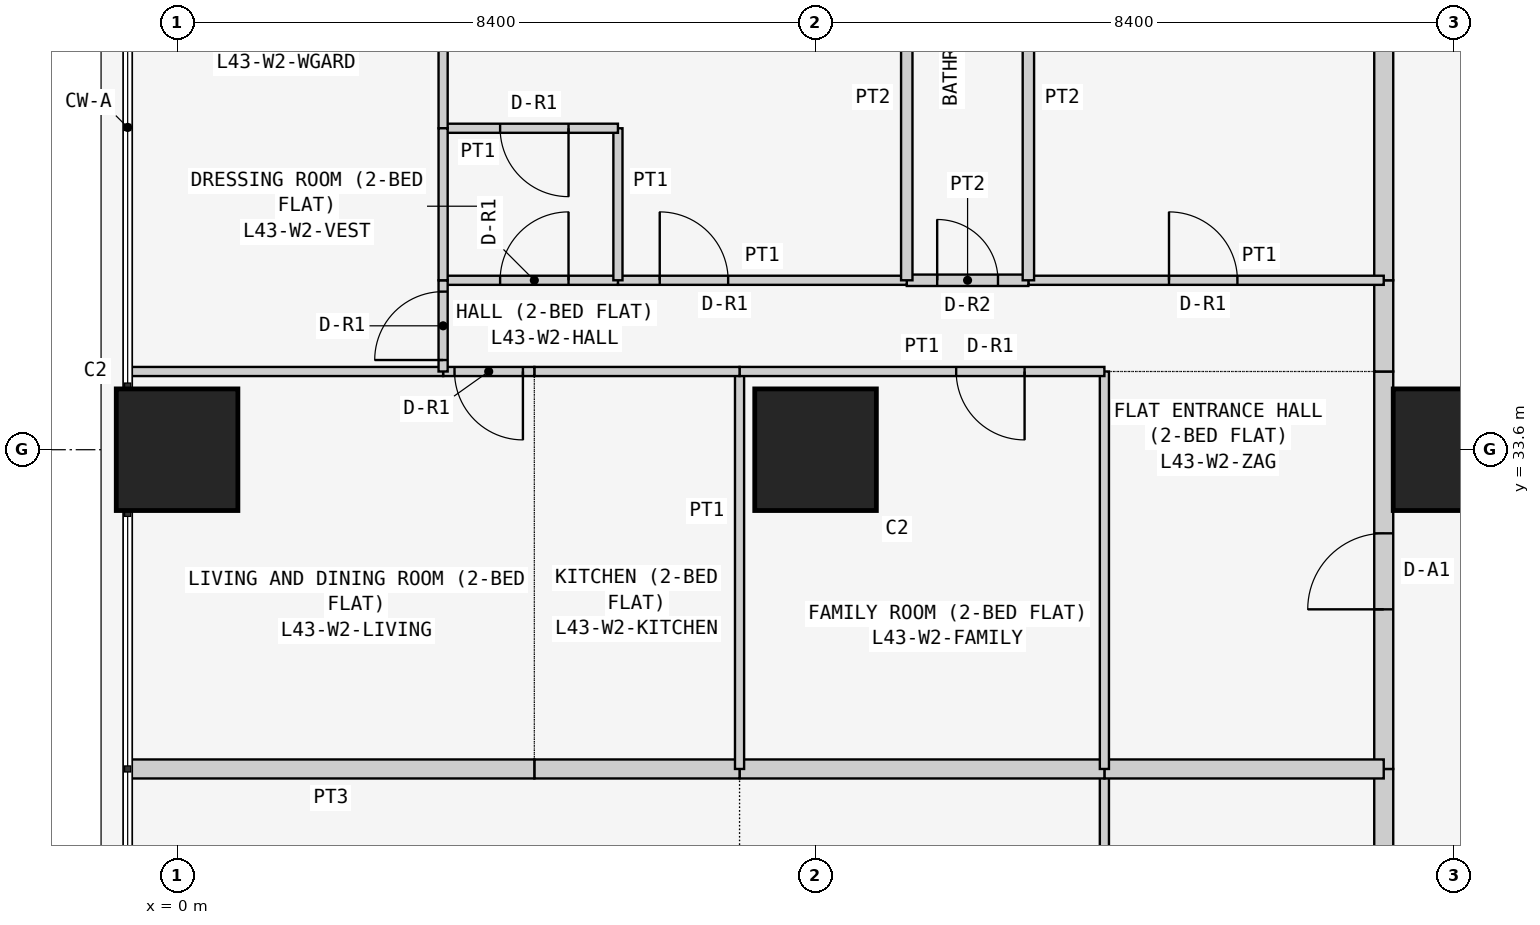
"""IFC4 building model, lengths in metres.
Left out: names, types, materials, properties, quantities, classifications, styles, units other than length and angle.
Written with IfcOpenShell. Run it as: python <this file> out.ifc"""

import sys

from ifc_helpers import new_model, si_unit, direction, frame, frame_2d, origin, origin_2d, place, context, subcontext, project, spatial, rectangle, extrude, element, fill, save


model = new_model("IFC4")
c1 = context("Model", 3, precision=1e-05, world=origin(), true_north=direction((0.0, 1.0)))
c2 = subcontext(c1, "Body", "Model", "MODEL_VIEW")
j1 = project(units=[si_unit("LENGTHUNIT", "METRE"), si_unit("PLANEANGLEUNIT", "RADIAN")], contexts=[c1])
p1 = place(None, origin())
s1 = spatial("IfcSite", under=j1, at=p1, CompositionType="ELEMENT")
p2 = place(p1, origin())
s2 = spatial("IfcBuilding", under=s1, at=p2, CompositionType="ELEMENT")
p3 = place(p2, frame((0.0, 0.0, 166.5)))
s3 = spatial("IfcBuildingStorey", under=s2, at=p3, CompositionType="ELEMENT", Elevation=166.5)
for number, where, z_axis, x_axis in (
    (1, (0.0, 33.6, 0.0), (0.0, 0.0, 1.0), (1.0, 0.0, 0.0)),
    (2, (8.4, 33.6, 0.0), (0.0, 0.0, 1.0), (1.0, 0.0, 0.0)),
    (3, (16.8, 33.6, 0.0), (0.0, 0.0, 1.0), (1.0, 0.0, 0.0)),
):
    element("IfcColumn", number, at=place(p3, frame(where, z_axis=z_axis, x_axis=x_axis)), inside=s3, PredefinedType="COLUMN", context=c2, shape_type="SweptSolid", body=[
        extrude(rectangle(XDim=1.6, YDim=1.6, at=origin_2d()), origin(), (0.0, 0.0, 1.0), 3.6),
    ])
p4 = place(p3, frame((15.875, 24.171, 0.0), z_axis=(0.0, 0.0, 1.0), x_axis=(0.0, 1.0, 0.0)))
e4 = element("IfcWall", 4, at=p4, inside=s3, PredefinedType="PARTITIONING", context=c2, shape_type="SweptSolid", body=[
    extrude(rectangle(XDim=5.229, YDim=0.25, at=frame_2d((2.615, 0.0))), origin(), (0.0, 0.0, 1.0), 3.45),
])
p5 = place(p4, frame((2.129, 0.0, 0.0)))
e5 = element("IfcOpeningElement", 5, at=p5, cuts=e4, PredefinedType="OPENING", context=c2, shape_type="SweptSolid", body=[
    extrude(rectangle(XDim=1.0, YDim=2.1, at=frame_2d((0.5, 1.05))), frame((0.0, 0.135, 0.0), z_axis=(0.0, -1.0, 0.0), x_axis=(1.0, 0.0, 0.0)), (0.0, 0.0, 1.0), 0.27),
])
p6 = place(p3, frame((15.875, 29.4, 0.0), z_axis=(0.0, 0.0, 1.0), x_axis=(0.0, 1.0, 0.0)))
e6 = element("IfcWall", 6, at=p6, inside=s3, PredefinedType="PARTITIONING", context=c2, shape_type="SweptSolid", body=[
    extrude(rectangle(XDim=5.229, YDim=0.25, at=frame_2d((2.615, 0.0))), origin(), (0.0, 0.0, 1.0), 3.45),
])
p7 = place(p6, frame((2.1, 0.0, 0.0)))
e7 = element("IfcOpeningElement", 7, at=p7, cuts=e6, PredefinedType="OPENING", context=c2, shape_type="SweptSolid", body=[
    extrude(rectangle(XDim=1.0, YDim=2.1, at=frame_2d((0.5, 1.05))), frame((0.0, 0.135, 0.0), z_axis=(0.0, -1.0, 0.0), x_axis=(1.0, 0.0, 0.0)), (0.0, 0.0, 1.0), 0.27),
])
p8 = place(p3, frame((15.875, 34.629, 0.0), z_axis=(0.0, 0.0, 1.0), x_axis=(0.0, 1.0, 0.0)))
e8 = element("IfcWall", 8, at=p8, inside=s3, PredefinedType="PARTITIONING", context=c2, shape_type="SweptSolid", body=[
    extrude(rectangle(XDim=1.2, YDim=0.25, at=frame_2d((0.6, 0.0))), origin(), (0.0, 0.0, 1.0), 3.45),
])
p9 = place(p3, frame((15.875, 35.829, 0.0), z_axis=(0.0, 0.0, 1.0), x_axis=(0.0, 1.0, 0.0)))
e9 = element("IfcWall", 9, at=p9, inside=s3, PredefinedType="PARTITIONING", context=c2, shape_type="SweptSolid", body=[
    extrude(rectangle(XDim=6.871, YDim=0.25, at=frame_2d((3.436, 0.0))), origin(), (0.0, 0.0, 1.0), 3.45),
])
p10 = place(p3, frame((12.2, 29.4, 0.0), z_axis=(0.0, 0.0, 1.0), x_axis=(0.0, -1.0, 0.0)))
e10 = element("IfcWall", 10, at=p10, inside=s3, PredefinedType="PARTITIONING", context=c2, shape_type="SweptSolid", body=[
    extrude(rectangle(XDim=5.229, YDim=0.12, at=frame_2d((2.615, 0.0))), origin(), (0.0, 0.0, 1.0), 3.45),
])
p11 = place(p10, frame((1.05, 0.0, 0.0)))
e11 = element("IfcOpeningElement", 11, at=p11, cuts=e10, PredefinedType="OPENING", context=c2, shape_type="SweptSolid", body=[
    extrude(rectangle(XDim=0.9, YDim=2.1, at=frame_2d((0.45, 1.05))), frame((0.0, 0.07, 0.0), z_axis=(0.0, -1.0, 0.0), x_axis=(1.0, 0.0, 0.0)), (0.0, 0.0, 1.0), 0.14),
])
p12 = place(p3, frame((15.875, 29.4, 0.0), z_axis=(0.0, 0.0, 1.0), x_axis=(-1.0, 0.0, 0.0)))
e12 = element("IfcWall", 12, at=p12, inside=s3, PredefinedType="PARTITIONING", context=c2, shape_type="SweptSolid", body=[
    extrude(rectangle(XDim=3.675, YDim=0.25, at=frame_2d((1.837, 0.0))), origin(), (0.0, 0.0, 1.0), 3.45),
])
p13 = place(p3, frame((12.2, 29.4, 0.0), z_axis=(0.0, 0.0, 1.0), x_axis=(-1.0, 0.0, 0.0)))
e13 = element("IfcWall", 13, at=p13, inside=s3, PredefinedType="PARTITIONING", context=c2, shape_type="SweptSolid", body=[
    extrude(rectangle(XDim=4.8, YDim=0.25, at=frame_2d((2.4, 0.0))), origin(), (0.0, 0.0, 1.0), 3.45),
])
p14 = place(p3, frame((7.4, 29.4, 0.0), z_axis=(0.0, 0.0, 1.0), x_axis=(-1.0, 0.0, 0.0)))
e14 = element("IfcWall", 14, at=p14, inside=s3, PredefinedType="PARTITIONING", context=c2, shape_type="SweptSolid", body=[
    extrude(rectangle(XDim=2.7, YDim=0.25, at=frame_2d((1.35, 0.0))), origin(), (0.0, 0.0, 1.0), 3.45),
])
p15 = place(p3, frame((4.7, 29.4, 0.0), z_axis=(0.0, 0.0, 1.0), x_axis=(-1.0, 0.0, 0.0)))
e15 = element("IfcWall", 15, at=p15, inside=s3, PredefinedType="PARTITIONING", context=c2, shape_type="SweptSolid", body=[
    extrude(rectangle(XDim=5.35, YDim=0.25, at=frame_2d((2.675, 0.0))), origin(), (0.0, 0.0, 1.0), 3.45),
])
for number, where, z_axis, x_axis in (
    (16, (12.2, 29.4, 0.0), (0.0, 0.0, 1.0), (0.0, 1.0, 0.0)),
    (17, (7.4, 29.4, 0.0), (0.0, 0.0, 1.0), (0.0, 1.0, 0.0)),
):
    element("IfcWall", number, at=place(p3, frame(where, z_axis=z_axis, x_axis=x_axis)), inside=s3, PredefinedType="PARTITIONING", context=c2, shape_type="SweptSolid", body=[
        extrude(rectangle(XDim=5.229, YDim=0.12, at=frame_2d((2.615, 0.0))), origin(), (0.0, 0.0, 1.0), 3.45),
    ])
p16 = place(p3, frame((7.4, 34.629, 0.0), z_axis=(0.0, 0.0, 1.0), x_axis=(1.0, 0.0, 0.0)))
e18 = element("IfcWall", 18, at=p16, inside=s3, PredefinedType="PARTITIONING", context=c2, shape_type="SweptSolid", body=[
    extrude(rectangle(XDim=4.8, YDim=0.12, at=frame_2d((2.4, 0.0))), origin(), (0.0, 0.0, 1.0), 3.45),
])
p17 = place(p16, frame((2.85, 0.0, 0.0)))
e19 = element("IfcOpeningElement", 19, at=p17, cuts=e18, PredefinedType="OPENING", context=c2, shape_type="SweptSolid", body=[
    extrude(rectangle(XDim=0.9, YDim=2.1, at=frame_2d((0.45, 1.05))), frame((0.0, 0.07, 0.0), z_axis=(0.0, -1.0, 0.0), x_axis=(1.0, 0.0, 0.0)), (0.0, 0.0, 1.0), 0.14),
])
p18 = place(p3, frame((4.7, 34.629, 0.0), z_axis=(0.0, 0.0, 1.0), x_axis=(1.0, 0.0, 0.0)))
e20 = element("IfcWall", 20, at=p18, inside=s3, PredefinedType="PARTITIONING", context=c2, shape_type="SweptSolid", body=[
    extrude(rectangle(XDim=2.7, YDim=0.12, at=frame_2d((1.35, 0.0))), origin(), (0.0, 0.0, 1.0), 3.45),
])
p19 = place(p3, frame((3.5, 34.629, 0.0), z_axis=(0.0, 0.0, 1.0), x_axis=(1.0, 0.0, 0.0)))
e21 = element("IfcWall", 21, at=p19, inside=s3, PredefinedType="PARTITIONING", context=c2, shape_type="SweptSolid", body=[
    extrude(rectangle(XDim=1.2, YDim=0.12, at=frame_2d((0.6, 0.0))), origin(), (0.0, 0.0, 1.0), 3.45),
])
p20 = place(p19, frame((0.15, 0.0, 0.0)))
e22 = element("IfcOpeningElement", 22, at=p20, cuts=e21, PredefinedType="OPENING", context=c2, shape_type="SweptSolid", body=[
    extrude(rectangle(XDim=0.9, YDim=2.1, at=frame_2d((0.45, 1.05))), frame((0.0, 0.07, 0.0), z_axis=(0.0, -1.0, 0.0), x_axis=(1.0, 0.0, 0.0)), (0.0, 0.0, 1.0), 0.14),
])
p21 = place(p3, frame((-0.65, 34.629, 0.0), z_axis=(0.0, 0.0, 1.0), x_axis=(1.0, 0.0, 0.0)))
e23 = element("IfcWall", 23, at=p21, inside=s3, PredefinedType="PARTITIONING", context=c2, shape_type="SweptSolid", body=[
    extrude(rectangle(XDim=4.15, YDim=0.12, at=frame_2d((2.075, 0.0))), origin(), (0.0, 0.0, 1.0), 3.45),
])
p22 = place(p3, frame((11.2, 35.829, 0.0), z_axis=(0.0, 0.0, 1.0), x_axis=(1.0, 0.0, 0.0)))
e24 = element("IfcWall", 24, at=p22, inside=s3, PredefinedType="PARTITIONING", context=c2, shape_type="SweptSolid", body=[
    extrude(rectangle(XDim=4.675, YDim=0.12, at=frame_2d((2.337, 0.0))), origin(), (0.0, 0.0, 1.0), 3.45),
])
p23 = place(p22, frame((1.85, 0.0, 0.0)))
e25 = element("IfcOpeningElement", 25, at=p23, cuts=e24, PredefinedType="OPENING", context=c2, shape_type="SweptSolid", body=[
    extrude(rectangle(XDim=0.9, YDim=2.1, at=frame_2d((0.45, 1.05))), frame((0.0, 0.07, 0.0), z_axis=(0.0, -1.0, 0.0), x_axis=(1.0, 0.0, 0.0)), (0.0, 0.0, 1.0), 0.14),
])
p24 = place(p3, frame((9.6, 35.829, 0.0), z_axis=(0.0, 0.0, 1.0), x_axis=(1.0, 0.0, 0.0)))
e26 = element("IfcWall", 26, at=p24, inside=s3, PredefinedType="PARTITIONING", context=c2, shape_type="SweptSolid", body=[
    extrude(rectangle(XDim=1.6, YDim=0.15, at=frame_2d((0.8, 0.0))), origin(), (0.0, 0.0, 1.0), 3.45),
])
p25 = place(p24, frame((0.4, 0.0, 0.0)))
e27 = element("IfcOpeningElement", 27, at=p25, cuts=e26, PredefinedType="OPENING", context=c2, shape_type="SweptSolid", body=[
    extrude(rectangle(XDim=0.8, YDim=2.1, at=frame_2d((0.4, 1.05))), frame((0.0, 0.085, 0.0), z_axis=(0.0, -1.0, 0.0), x_axis=(1.0, 0.0, 0.0)), (0.0, 0.0, 1.0), 0.17),
])
p26 = place(p3, frame((5.8, 35.829, 0.0), z_axis=(0.0, 0.0, 1.0), x_axis=(1.0, 0.0, 0.0)))
e28 = element("IfcWall", 28, at=p26, inside=s3, PredefinedType="PARTITIONING", context=c2, shape_type="SweptSolid", body=[
    extrude(rectangle(XDim=3.8, YDim=0.12, at=frame_2d((1.9, 0.0))), origin(), (0.0, 0.0, 1.0), 3.45),
])
p27 = place(p26, frame((0.55, 0.0, 0.0)))
e29 = element("IfcOpeningElement", 29, at=p27, cuts=e28, PredefinedType="OPENING", context=c2, shape_type="SweptSolid", body=[
    extrude(rectangle(XDim=0.9, YDim=2.1, at=frame_2d((0.45, 1.05))), frame((0.0, 0.07, 0.0), z_axis=(0.0, -1.0, 0.0), x_axis=(1.0, 0.0, 0.0)), (0.0, 0.0, 1.0), 0.14),
])
p28 = place(p3, frame((3.5, 35.829, 0.0), z_axis=(0.0, 0.0, 1.0), x_axis=(1.0, 0.0, 0.0)))
e30 = element("IfcWall", 30, at=p28, inside=s3, PredefinedType="PARTITIONING", context=c2, shape_type="SweptSolid", body=[
    extrude(rectangle(XDim=2.3, YDim=0.12, at=frame_2d((1.15, 0.0))), origin(), (0.0, 0.0, 1.0), 3.45),
])
p29 = place(p28, frame((0.75, 0.0, 0.0)))
e31 = element("IfcOpeningElement", 31, at=p29, cuts=e30, PredefinedType="OPENING", context=c2, shape_type="SweptSolid", body=[
    extrude(rectangle(XDim=0.9, YDim=2.1, at=frame_2d((0.45, 1.05))), frame((0.0, 0.07, 0.0), z_axis=(0.0, -1.0, 0.0), x_axis=(1.0, 0.0, 0.0)), (0.0, 0.0, 1.0), 0.14),
])
p30 = place(p3, frame((3.5, 34.629, 0.0), z_axis=(0.0, 0.0, 1.0), x_axis=(0.0, 1.0, 0.0)))
e32 = element("IfcWall", 32, at=p30, inside=s3, PredefinedType="PARTITIONING", context=c2, shape_type="SweptSolid", body=[
    extrude(rectangle(XDim=1.2, YDim=0.12, at=frame_2d((0.6, 0.0))), origin(), (0.0, 0.0, 1.0), 3.45),
])
p31 = place(p30, frame((0.151, 0.0, 0.0)))
e33 = element("IfcOpeningElement", 33, at=p31, cuts=e32, PredefinedType="OPENING", context=c2, shape_type="SweptSolid", body=[
    extrude(rectangle(XDim=0.9, YDim=2.1, at=frame_2d((0.45, 1.05))), frame((0.0, 0.07, 0.0), z_axis=(0.0, -1.0, 0.0), x_axis=(1.0, 0.0, 0.0)), (0.0, 0.0, 1.0), 0.14),
])
for number, where, z_axis, x_axis in (
    (34, (11.2, 35.829, 0.0), (0.0, 0.0, 1.0), (0.0, 1.0, 0.0)),
    (35, (9.6, 35.829, 0.0), (0.0, 0.0, 1.0), (0.0, 1.0, 0.0)),
):
    element("IfcWall", number, at=place(p3, frame(where, z_axis=z_axis, x_axis=x_axis)), inside=s3, PredefinedType="PARTITIONING", context=c2, shape_type="SweptSolid", body=[
        extrude(rectangle(XDim=6.871, YDim=0.15, at=frame_2d((3.436, 0.0))), origin(), (0.0, 0.0, 1.0), 3.45),
    ])
p32 = place(p3, frame((5.8, 35.829, 0.0), z_axis=(0.0, 0.0, 1.0), x_axis=(0.0, 1.0, 0.0)))
e36 = element("IfcWall", 36, at=p32, inside=s3, PredefinedType="PARTITIONING", context=c2, shape_type="SweptSolid", body=[
    extrude(rectangle(XDim=2.0, YDim=0.12, at=frame_2d((1.0, 0.0))), origin(), (0.0, 0.0, 1.0), 3.45),
])
p33 = place(p3, frame((5.8, 37.829, 0.0), z_axis=(0.0, 0.0, 1.0), x_axis=(-1.0, 0.0, 0.0)))
e37 = element("IfcWall", 37, at=p33, inside=s3, PredefinedType="PARTITIONING", context=c2, shape_type="SweptSolid", body=[
    extrude(rectangle(XDim=2.3, YDim=0.12, at=frame_2d((1.15, 0.0))), origin(), (0.0, 0.0, 1.0), 3.45),
])
p34 = place(p33, frame((0.65, 0.0, 0.0)))
e38 = element("IfcOpeningElement", 38, at=p34, cuts=e37, PredefinedType="OPENING", context=c2, shape_type="SweptSolid", body=[
    extrude(rectangle(XDim=0.9, YDim=2.1, at=frame_2d((0.45, 1.05))), frame((0.0, 0.07, 0.0), z_axis=(0.0, -1.0, 0.0), x_axis=(1.0, 0.0, 0.0)), (0.0, 0.0, 1.0), 0.14),
])
p35 = place(p3, frame((3.5, 37.829, 0.0), z_axis=(0.0, 0.0, 1.0), x_axis=(0.0, 1.0, 0.0)))
e39 = element("IfcWall", 39, at=p35, inside=s3, PredefinedType="PARTITIONING", context=c2, shape_type="SweptSolid", body=[
    extrude(rectangle(XDim=4.871, YDim=0.12, at=frame_2d((2.436, 0.0))), origin(), (0.0, 0.0, 1.0), 3.45),
])
p36 = place(p3, frame((3.5, 35.829, 0.0), z_axis=(0.0, 0.0, 1.0), x_axis=(0.0, 1.0, 0.0)))
e40 = element("IfcWall", 40, at=p36, inside=s3, PredefinedType="PARTITIONING", context=c2, shape_type="SweptSolid", body=[
    extrude(rectangle(XDim=2.0, YDim=0.12, at=frame_2d((1.0, 0.0))), origin(), (0.0, 0.0, 1.0), 3.45),
])
p37 = place(p7, origin())
e41 = element("IfcDoor", 41, at=p37, inside=s3, OperationType="SINGLE_SWING_LEFT", PredefinedType="DOOR", context=c2, shape_type="SweptSolid", body=[
    extrude(rectangle(XDim=1.0, YDim=2.1, at=frame_2d((0.5, 1.05))), frame((0.0, 0.025, 0.0), z_axis=(0.0, -1.0, 0.0), x_axis=(1.0, 0.0, 0.0)), (0.0, 0.0, 1.0), 0.05),
])
fill(e7, e41)
p38 = place(p17, frame((0.9, 0.0, 0.0), z_axis=(0.0, 0.0, 1.0), x_axis=(-1.0, 0.0, 0.0)))
e42 = element("IfcDoor", 42, at=p38, inside=s3, OperationType="SINGLE_SWING_LEFT", PredefinedType="DOOR", context=c2, shape_type="SweptSolid", body=[
    extrude(rectangle(XDim=0.9, YDim=2.1, at=frame_2d((0.45, 1.05))), frame((0.0, 0.025, 0.0), z_axis=(0.0, -1.0, 0.0), x_axis=(1.0, 0.0, 0.0)), (0.0, 0.0, 1.0), 0.05),
])
fill(e19, e42)
p39 = place(p20, frame((0.9, 0.0, 0.0), z_axis=(0.0, 0.0, 1.0), x_axis=(-1.0, 0.0, 0.0)))
e43 = element("IfcDoor", 43, at=p39, inside=s3, OperationType="SINGLE_SWING_LEFT", PredefinedType="DOOR", context=c2, shape_type="SweptSolid", body=[
    extrude(rectangle(XDim=0.9, YDim=2.1, at=frame_2d((0.45, 1.05))), frame((0.0, 0.025, 0.0), z_axis=(0.0, -1.0, 0.0), x_axis=(1.0, 0.0, 0.0)), (0.0, 0.0, 1.0), 0.05),
])
fill(e22, e43)
p40 = place(p23, origin())
e44 = element("IfcDoor", 44, at=p40, inside=s3, OperationType="SINGLE_SWING_LEFT", PredefinedType="DOOR", context=c2, shape_type="SweptSolid", body=[
    extrude(rectangle(XDim=0.9, YDim=2.1, at=frame_2d((0.45, 1.05))), frame((0.0, 0.025, 0.0), z_axis=(0.0, -1.0, 0.0), x_axis=(1.0, 0.0, 0.0)), (0.0, 0.0, 1.0), 0.05),
])
fill(e25, e44)
p41 = place(p25, origin())
e45 = element("IfcDoor", 45, at=p41, inside=s3, OperationType="SINGLE_SWING_LEFT", PredefinedType="DOOR", context=c2, shape_type="SweptSolid", body=[
    extrude(rectangle(XDim=0.8, YDim=2.1, at=frame_2d((0.4, 1.05))), frame((0.0, 0.025, 0.0), z_axis=(0.0, -1.0, 0.0), x_axis=(1.0, 0.0, 0.0)), (0.0, 0.0, 1.0), 0.05),
])
fill(e27, e45)
p42 = place(p27, origin())
e46 = element("IfcDoor", 46, at=p42, inside=s3, OperationType="SINGLE_SWING_LEFT", PredefinedType="DOOR", context=c2, shape_type="SweptSolid", body=[
    extrude(rectangle(XDim=0.9, YDim=2.1, at=frame_2d((0.45, 1.05))), frame((0.0, 0.025, 0.0), z_axis=(0.0, -1.0, 0.0), x_axis=(1.0, 0.0, 0.0)), (0.0, 0.0, 1.0), 0.05),
])
fill(e29, e46)
p43 = place(p29, origin())
e47 = element("IfcDoor", 47, at=p43, inside=s3, OperationType="SINGLE_SWING_RIGHT", PredefinedType="DOOR", context=c2, shape_type="SweptSolid", body=[
    extrude(rectangle(XDim=0.9, YDim=2.1, at=frame_2d((0.45, 1.05))), frame((0.0, 0.025, 0.0), z_axis=(0.0, -1.0, 0.0), x_axis=(1.0, 0.0, 0.0)), (0.0, 0.0, 1.0), 0.05),
])
fill(e31, e47)
p44 = place(p34, origin())
e48 = element("IfcDoor", 48, at=p44, inside=s3, OperationType="SINGLE_SWING_LEFT", PredefinedType="DOOR", context=c2, shape_type="SweptSolid", body=[
    extrude(rectangle(XDim=0.9, YDim=2.1, at=frame_2d((0.45, 1.05))), frame((0.0, 0.025, 0.0), z_axis=(0.0, -1.0, 0.0), x_axis=(1.0, 0.0, 0.0)), (0.0, 0.0, 1.0), 0.05),
])
fill(e38, e48)
p45 = place(p31, origin())
e49 = element("IfcDoor", 49, at=p45, inside=s3, OperationType="SINGLE_SWING_LEFT", PredefinedType="DOOR", context=c2, shape_type="SweptSolid", body=[
    extrude(rectangle(XDim=0.9, YDim=2.1, at=frame_2d((0.45, 1.05))), frame((0.0, 0.025, 0.0), z_axis=(0.0, -1.0, 0.0), x_axis=(1.0, 0.0, 0.0)), (0.0, 0.0, 1.0), 0.05),
])
fill(e33, e49)
save(model, sys.argv[1])
